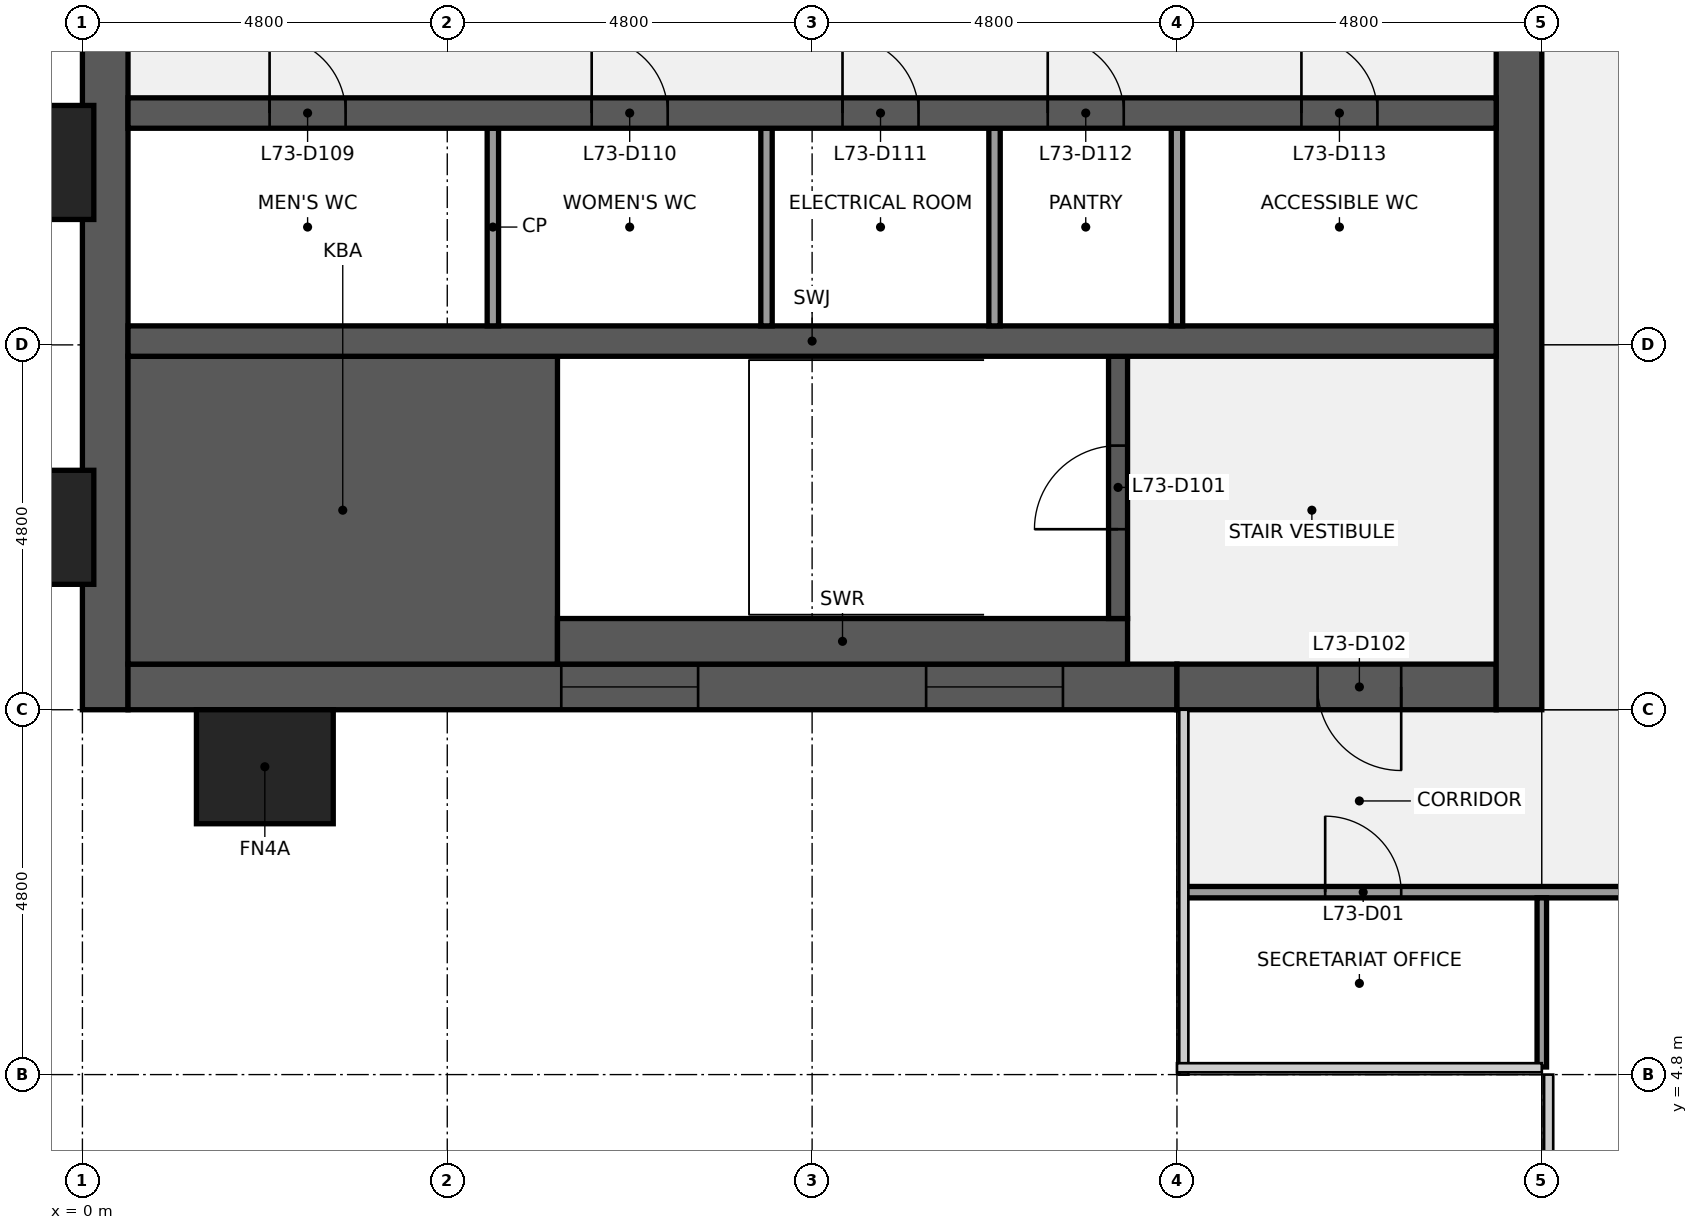
"""IFC4 building model, lengths in metres.
Left out: names, types, materials, properties, quantities, classifications, styles, units other than length and angle.
Written with IfcOpenShell. Run it as: python <this file> out.ifc"""

import sys

from ifc_helpers import new_model, si_unit, direction, frame, frame_2d, origin, origin_2d, place, context, subcontext, project, spatial, rectangle, extrude, element, fill, save


model = new_model("IFC4")
c1 = context("Model", 3, precision=1e-05, world=origin(), true_north=direction((0.0, 1.0)))
c2 = subcontext(c1, "Body", "Model", "MODEL_VIEW")
j1 = project(units=[si_unit("LENGTHUNIT", "METRE"), si_unit("PLANEANGLEUNIT", "RADIAN")], contexts=[c1])
p1 = place(None, origin())
s1 = spatial("IfcSite", under=j1, at=p1, CompositionType="ELEMENT")
p2 = place(p1, origin())
s2 = spatial("IfcBuilding", under=s1, at=p2, CompositionType="ELEMENT")
p3 = place(p2, frame((0.0, 0.0, 330.3)))
s3 = spatial("IfcBuildingStorey", under=s2, at=p3, CompositionType="ELEMENT", Elevation=330.3)
p4 = place(p3, frame((0.3, 9.6, 0.0), z_axis=(0.0, 0.0, 1.0), x_axis=(0.0, 1.0, 0.0)))
e1 = element("IfcWall", 1, at=p4, inside=s3, PredefinedType="SHEAR", context=c2, shape_type="SweptSolid", body=[
    extrude(rectangle(XDim=28.8, YDim=0.6, at=frame_2d((14.4, 0.0))), origin(), (0.0, 0.0, 1.0), 3.84),
])
p5 = place(p4, frame((8.85, 0.0, 0.9)))
e2 = element("IfcOpeningElement", 2, at=p5, cuts=e1, PredefinedType="OPENING", context=c2, shape_type="SweptSolid", body=[
    extrude(rectangle(XDim=1.5, YDim=1.5, at=frame_2d((0.75, 0.75))), frame((0.0, 0.31, 0.0), z_axis=(0.0, -1.0, 0.0), x_axis=(1.0, 0.0, 0.0)), (0.0, 0.0, 1.0), 0.62),
])
p6 = place(p4, frame((18.45, 0.0, 0.9)))
e3 = element("IfcOpeningElement", 3, at=p6, cuts=e1, PredefinedType="OPENING", context=c2, shape_type="SweptSolid", body=[
    extrude(rectangle(XDim=1.5, YDim=1.5, at=frame_2d((0.75, 0.75))), frame((0.0, 0.31, 0.0), z_axis=(0.0, -1.0, 0.0), x_axis=(1.0, 0.0, 0.0)), (0.0, 0.0, 1.0), 0.62),
])
p7 = place(p3, frame((14.4, 9.9, 0.0), z_axis=(0.0, 0.0, 1.0), x_axis=(-1.0, 0.0, 0.0)))
e4 = element("IfcWall", 4, at=p7, inside=s3, PredefinedType="SHEAR", context=c2, shape_type="SweptSolid", body=[
    extrude(rectangle(XDim=13.8, YDim=0.6, at=frame_2d((6.9, 0.0))), origin(), (0.0, 0.0, 1.0), 3.84),
])
p8 = place(p7, frame((6.3, 0.0, 0.9)))
e5 = element("IfcOpeningElement", 5, at=p8, cuts=e4, PredefinedType="OPENING", context=c2, shape_type="SweptSolid", body=[
    extrude(rectangle(XDim=1.8, YDim=1.5, at=frame_2d((0.9, 0.75))), frame((0.0, 0.31, 0.0), z_axis=(0.0, -1.0, 0.0), x_axis=(1.0, 0.0, 0.0)), (0.0, 0.0, 1.0), 0.62),
])
p9 = place(p7, frame((1.5, 0.0, 0.9)))
e6 = element("IfcOpeningElement", 6, at=p9, cuts=e4, PredefinedType="OPENING", context=c2, shape_type="SweptSolid", body=[
    extrude(rectangle(XDim=1.8, YDim=1.5, at=frame_2d((0.9, 0.75))), frame((0.0, 0.31, 0.0), z_axis=(0.0, -1.0, 0.0), x_axis=(1.0, 0.0, 0.0)), (0.0, 0.0, 1.0), 0.62),
])
p10 = place(p3, frame((18.6, 9.9, 0.0), z_axis=(0.0, 0.0, 1.0), x_axis=(-1.0, 0.0, 0.0)))
e7 = element("IfcWall", 7, at=p10, inside=s3, PredefinedType="SHEAR", context=c2, shape_type="SweptSolid", body=[
    extrude(rectangle(XDim=4.2, YDim=0.6, at=frame_2d((2.1, 0.0))), origin(), (0.0, 0.0, 1.0), 3.84),
])
p11 = place(p10, frame((1.25, 0.0, 0.0)))
e8 = element("IfcOpeningElement", 8, at=p11, cuts=e7, PredefinedType="OPENING", context=c2, shape_type="SweptSolid", body=[
    extrude(rectangle(XDim=1.1, YDim=2.1, at=frame_2d((0.55, 1.05))), frame((0.0, 0.31, 0.0), z_axis=(0.0, -1.0, 0.0), x_axis=(1.0, 0.0, 0.0)), (0.0, 0.0, 1.0), 0.62),
])
p12 = place(p3, frame((18.9, 38.4, 0.0), z_axis=(0.0, 0.0, 1.0), x_axis=(0.0, -1.0, 0.0)))
e9 = element("IfcWall", 9, at=p12, inside=s3, PredefinedType="SHEAR", context=c2, shape_type="SweptSolid", body=[
    extrude(rectangle(XDim=28.8, YDim=0.6, at=frame_2d((14.4, 0.0))), origin(), (0.0, 0.0, 1.0), 3.84),
])
p13 = place(p12, frame((18.3, 0.0, 0.0)))
e10 = element("IfcOpeningElement", 10, at=p13, cuts=e9, PredefinedType="OPENING", context=c2, shape_type="SweptSolid", body=[
    extrude(rectangle(XDim=1.8, YDim=2.1, at=frame_2d((0.9, 1.05))), frame((0.0, 0.31, 0.0), z_axis=(0.0, -1.0, 0.0), x_axis=(1.0, 0.0, 0.0)), (0.0, 0.0, 1.0), 0.62),
])
p14 = place(p12, frame((8.7, 0.0, 0.0)))
e11 = element("IfcOpeningElement", 11, at=p14, cuts=e9, PredefinedType="OPENING", context=c2, shape_type="SweptSolid", body=[
    extrude(rectangle(XDim=1.8, YDim=2.1, at=frame_2d((0.9, 1.05))), frame((0.0, 0.31, 0.0), z_axis=(0.0, -1.0, 0.0), x_axis=(1.0, 0.0, 0.0)), (0.0, 0.0, 1.0), 0.62),
])
p15 = place(p3, frame((0.6, 12.225, 0.0), z_axis=(0.0, 0.0, 1.0), x_axis=(1.0, 0.0, 0.0)))
e12 = element("IfcWall", 12, at=p15, inside=s3, PredefinedType="SHEAR", context=c2, shape_type="SweptSolid", body=[
    extrude(rectangle(XDim=5.65, YDim=4.05, at=frame_2d((2.825, 0.0))), origin(), (0.0, 0.0, 1.0), 3.84),
])
p16 = place(p3, frame((6.25, 10.5, 0.0), z_axis=(0.0, 0.0, 1.0), x_axis=(1.0, 0.0, 0.0)))
e13 = element("IfcWall", 13, at=p16, inside=s3, PredefinedType="SHEAR", context=c2, shape_type="SweptSolid", body=[
    extrude(rectangle(XDim=7.5, YDim=0.6, at=frame_2d((3.75, 0.0))), origin(), (0.0, 0.0, 1.0), 3.84),
])
p17 = place(p3, frame((13.625, 10.8, 0.0), z_axis=(0.0, 0.0, 1.0), x_axis=(0.0, 1.0, 0.0)))
e14 = element("IfcWall", 14, at=p17, inside=s3, PredefinedType="SHEAR", context=c2, shape_type="SweptSolid", body=[
    extrude(rectangle(XDim=3.45, YDim=0.25, at=frame_2d((1.725, 0.0))), origin(), (0.0, 0.0, 1.0), 3.84),
])
p18 = place(p17, frame((1.175, 0.0, 0.0)))
e15 = element("IfcOpeningElement", 15, at=p18, cuts=e14, PredefinedType="OPENING", context=c2, shape_type="SweptSolid", body=[
    extrude(rectangle(XDim=1.1, YDim=2.1, at=frame_2d((0.55, 1.05))), frame((0.0, 0.135, 0.0), z_axis=(0.0, -1.0, 0.0), x_axis=(1.0, 0.0, 0.0)), (0.0, 0.0, 1.0), 0.27),
])
p19 = place(p3, frame((0.6, 14.45, 0.0), z_axis=(0.0, 0.0, 1.0), x_axis=(1.0, 0.0, 0.0)))
e16 = element("IfcWall", 16, at=p19, inside=s3, PredefinedType="SHEAR", context=c2, shape_type="SweptSolid", body=[
    extrude(rectangle(XDim=18.0, YDim=0.4, at=frame_2d((9.0, 0.0))), origin(), (0.0, 0.0, 1.0), 3.84),
])
for number, where, z_axis, x_axis in (
    (17, (5.4, 14.65, 0.0), (0.0, 0.0, 1.0), (0.0, 1.0, 0.0)),
    (18, (9.0, 14.65, 0.0), (0.0, 0.0, 1.0), (0.0, 1.0, 0.0)),
    (19, (12.0, 14.65, 0.0), (0.0, 0.0, 1.0), (0.0, 1.0, 0.0)),
    (20, (14.4, 14.65, 0.0), (0.0, 0.0, 1.0), (0.0, 1.0, 0.0)),
):
    element("IfcWall", number, at=place(p3, frame(where, z_axis=z_axis, x_axis=x_axis)), inside=s3, PredefinedType="PARTITIONING", context=c2, shape_type="SweptSolid", body=[
        extrude(rectangle(XDim=2.6, YDim=0.15, at=frame_2d((1.3, 0.0))), origin(), (0.0, 0.0, 1.0), 3.84),
    ])
p20 = place(p3, frame((0.6, 17.45, 0.0), z_axis=(0.0, 0.0, 1.0), x_axis=(1.0, 0.0, 0.0)))
e21 = element("IfcWall", 21, at=p20, inside=s3, PredefinedType="SHEAR", context=c2, shape_type="SweptSolid", body=[
    extrude(rectangle(XDim=18.0, YDim=0.4, at=frame_2d((9.0, 0.0))), origin(), (0.0, 0.0, 1.0), 3.84),
])
p21 = place(p20, frame((1.863, 0.0, 0.0)))
e22 = element("IfcOpeningElement", 22, at=p21, cuts=e21, PredefinedType="OPENING", context=c2, shape_type="SweptSolid", body=[
    extrude(rectangle(XDim=1.0, YDim=2.1, at=frame_2d((0.5, 1.05))), frame((0.0, 0.21, 0.0), z_axis=(0.0, -1.0, 0.0), x_axis=(1.0, 0.0, 0.0)), (0.0, 0.0, 1.0), 0.42),
])
p22 = place(p20, frame((6.1, 0.0, 0.0)))
e23 = element("IfcOpeningElement", 23, at=p22, cuts=e21, PredefinedType="OPENING", context=c2, shape_type="SweptSolid", body=[
    extrude(rectangle(XDim=1.0, YDim=2.1, at=frame_2d((0.5, 1.05))), frame((0.0, 0.21, 0.0), z_axis=(0.0, -1.0, 0.0), x_axis=(1.0, 0.0, 0.0)), (0.0, 0.0, 1.0), 0.42),
])
p23 = place(p20, frame((9.4, 0.0, 0.0)))
e24 = element("IfcOpeningElement", 24, at=p23, cuts=e21, PredefinedType="OPENING", context=c2, shape_type="SweptSolid", body=[
    extrude(rectangle(XDim=1.0, YDim=2.1, at=frame_2d((0.5, 1.05))), frame((0.0, 0.21, 0.0), z_axis=(0.0, -1.0, 0.0), x_axis=(1.0, 0.0, 0.0)), (0.0, 0.0, 1.0), 0.42),
])
p24 = place(p20, frame((12.1, 0.0, 0.0)))
e25 = element("IfcOpeningElement", 25, at=p24, cuts=e21, PredefinedType="OPENING", context=c2, shape_type="SweptSolid", body=[
    extrude(rectangle(XDim=1.0, YDim=2.1, at=frame_2d((0.5, 1.05))), frame((0.0, 0.21, 0.0), z_axis=(0.0, -1.0, 0.0), x_axis=(1.0, 0.0, 0.0)), (0.0, 0.0, 1.0), 0.42),
])
p25 = place(p20, frame((15.438, 0.0, 0.0)))
e26 = element("IfcOpeningElement", 26, at=p25, cuts=e21, PredefinedType="OPENING", context=c2, shape_type="SweptSolid", body=[
    extrude(rectangle(XDim=1.0, YDim=2.1, at=frame_2d((0.5, 1.05))), frame((0.0, 0.21, 0.0), z_axis=(0.0, -1.0, 0.0), x_axis=(1.0, 0.0, 0.0)), (0.0, 0.0, 1.0), 0.42),
])
p26 = place(p3, frame((14.5, 7.2, 0.0), z_axis=(0.0, 0.0, 1.0), x_axis=(1.0, 0.0, 0.0)))
e27 = element("IfcWall", 27, at=p26, inside=s3, PredefinedType="PARTITIONING", context=c2, shape_type="SweptSolid", body=[
    extrude(rectangle(XDim=28.6, YDim=0.15, at=frame_2d((14.3, 0.0))), origin(), (0.0, 0.0, 1.0), 2.87),
])
p27 = place(p26, frame((1.85, 0.0, 0.0)))
e28 = element("IfcOpeningElement", 28, at=p27, cuts=e27, PredefinedType="OPENING", context=c2, shape_type="SweptSolid", body=[
    extrude(rectangle(XDim=1.0, YDim=2.1, at=frame_2d((0.5, 1.05))), frame((0.0, 0.085, 0.0), z_axis=(0.0, -1.0, 0.0), x_axis=(1.0, 0.0, 0.0)), (0.0, 0.0, 1.0), 0.17),
])
p28 = place(p26, frame((6.6, 0.0, 0.0)))
e29 = element("IfcOpeningElement", 29, at=p28, cuts=e27, PredefinedType="OPENING", context=c2, shape_type="SweptSolid", body=[
    extrude(rectangle(XDim=1.0, YDim=2.1, at=frame_2d((0.5, 1.05))), frame((0.0, 0.085, 0.0), z_axis=(0.0, -1.0, 0.0), x_axis=(1.0, 0.0, 0.0)), (0.0, 0.0, 1.0), 0.17),
])
p29 = place(p26, frame((13.8, 0.0, 0.0)))
e30 = element("IfcOpeningElement", 30, at=p29, cuts=e27, PredefinedType="OPENING", context=c2, shape_type="SweptSolid", body=[
    extrude(rectangle(XDim=1.0, YDim=2.1, at=frame_2d((0.5, 1.05))), frame((0.0, 0.085, 0.0), z_axis=(0.0, -1.0, 0.0), x_axis=(1.0, 0.0, 0.0)), (0.0, 0.0, 1.0), 0.17),
])
p30 = place(p26, frame((21.0, 0.0, 0.0)))
e31 = element("IfcOpeningElement", 31, at=p30, cuts=e27, PredefinedType="OPENING", context=c2, shape_type="SweptSolid", body=[
    extrude(rectangle(XDim=1.0, YDim=2.1, at=frame_2d((0.5, 1.05))), frame((0.0, 0.085, 0.0), z_axis=(0.0, -1.0, 0.0), x_axis=(1.0, 0.0, 0.0)), (0.0, 0.0, 1.0), 0.17),
])
p31 = place(p26, frame((25.75, 0.0, 0.0)))
e32 = element("IfcOpeningElement", 32, at=p31, cuts=e27, PredefinedType="OPENING", context=c2, shape_type="SweptSolid", body=[
    extrude(rectangle(XDim=1.0, YDim=2.1, at=frame_2d((0.5, 1.05))), frame((0.0, 0.085, 0.0), z_axis=(0.0, -1.0, 0.0), x_axis=(1.0, 0.0, 0.0)), (0.0, 0.0, 1.0), 0.17),
])
p32 = place(p3, frame((19.2, 4.9, 0.0), z_axis=(0.0, 0.0, 1.0), x_axis=(0.0, 1.0, 0.0)))
e33 = element("IfcWall", 33, at=p32, inside=s3, PredefinedType="PARTITIONING", context=c2, shape_type="SweptSolid", body=[
    extrude(rectangle(XDim=2.225, YDim=0.125, at=frame_2d((1.113, 0.0))), origin(), (0.0, 0.0, 1.0), 2.87),
])
for number, where, z_axis, x_axis in (
    (34, (-0.75, 12.0, 0.0), (0.0, 0.0, 1.0), (0.0, 1.0, 0.0)),
    (35, (-0.75, 16.8, 0.0), (0.0, 0.0, 1.0), (0.0, 1.0, 0.0)),
    (36, (2.4, 8.85, 0.0), (0.0, 0.0, 1.0), (1.0, 0.0, 0.0)),
):
    element("IfcColumn", number, at=place(p3, frame(where, z_axis=z_axis, x_axis=x_axis)), inside=s3, PredefinedType="PILASTER", context=c2, shape_type="SweptSolid", body=[
        extrude(rectangle(XDim=1.8, YDim=1.5, at=origin_2d()), origin(), (0.0, 0.0, 1.0), 4.0),
    ])
p33 = place(p18, origin())
e37 = element("IfcDoor", 37, at=p33, inside=s3, OperationType="SINGLE_SWING_LEFT", PredefinedType="DOOR", context=c2, shape_type="SweptSolid", body=[
    extrude(rectangle(XDim=1.1, YDim=2.1, at=frame_2d((0.55, 1.05))), frame((0.0, 0.025, 0.0), z_axis=(0.0, -1.0, 0.0), x_axis=(1.0, 0.0, 0.0)), (0.0, 0.0, 1.0), 0.05),
])
fill(e15, e37)
p34 = place(p11, origin())
e38 = element("IfcDoor", 38, at=p34, inside=s3, OperationType="SINGLE_SWING_LEFT", PredefinedType="DOOR", context=c2, shape_type="SweptSolid", body=[
    extrude(rectangle(XDim=1.1, YDim=2.1, at=frame_2d((0.55, 1.05))), frame((0.0, 0.025, 0.0), z_axis=(0.0, -1.0, 0.0), x_axis=(1.0, 0.0, 0.0)), (0.0, 0.0, 1.0), 0.05),
])
fill(e8, e38)
p35 = place(p21, origin())
e39 = element("IfcDoor", 39, at=p35, inside=s3, OperationType="SINGLE_SWING_LEFT", PredefinedType="DOOR", context=c2, shape_type="SweptSolid", body=[
    extrude(rectangle(XDim=1.0, YDim=2.1, at=frame_2d((0.5, 1.05))), frame((0.0, 0.025, 0.0), z_axis=(0.0, -1.0, 0.0), x_axis=(1.0, 0.0, 0.0)), (0.0, 0.0, 1.0), 0.05),
])
fill(e22, e39)
p36 = place(p22, origin())
e40 = element("IfcDoor", 40, at=p36, inside=s3, OperationType="SINGLE_SWING_LEFT", PredefinedType="DOOR", context=c2, shape_type="SweptSolid", body=[
    extrude(rectangle(XDim=1.0, YDim=2.1, at=frame_2d((0.5, 1.05))), frame((0.0, 0.025, 0.0), z_axis=(0.0, -1.0, 0.0), x_axis=(1.0, 0.0, 0.0)), (0.0, 0.0, 1.0), 0.05),
])
fill(e23, e40)
p37 = place(p23, origin())
e41 = element("IfcDoor", 41, at=p37, inside=s3, OperationType="SINGLE_SWING_LEFT", PredefinedType="DOOR", context=c2, shape_type="SweptSolid", body=[
    extrude(rectangle(XDim=1.0, YDim=2.1, at=frame_2d((0.5, 1.05))), frame((0.0, 0.025, 0.0), z_axis=(0.0, -1.0, 0.0), x_axis=(1.0, 0.0, 0.0)), (0.0, 0.0, 1.0), 0.05),
])
fill(e24, e41)
p38 = place(p24, origin())
e42 = element("IfcDoor", 42, at=p38, inside=s3, OperationType="SINGLE_SWING_LEFT", PredefinedType="DOOR", context=c2, shape_type="SweptSolid", body=[
    extrude(rectangle(XDim=1.0, YDim=2.1, at=frame_2d((0.5, 1.05))), frame((0.0, 0.025, 0.0), z_axis=(0.0, -1.0, 0.0), x_axis=(1.0, 0.0, 0.0)), (0.0, 0.0, 1.0), 0.05),
])
fill(e25, e42)
p39 = place(p25, origin())
e43 = element("IfcDoor", 43, at=p39, inside=s3, OperationType="SINGLE_SWING_LEFT", PredefinedType="DOOR", context=c2, shape_type="SweptSolid", body=[
    extrude(rectangle(XDim=1.0, YDim=2.1, at=frame_2d((0.5, 1.05))), frame((0.0, 0.025, 0.0), z_axis=(0.0, -1.0, 0.0), x_axis=(1.0, 0.0, 0.0)), (0.0, 0.0, 1.0), 0.05),
])
fill(e26, e43)
p40 = place(p8, origin())
e44 = element("IfcWindow", 44, at=p40, inside=s3, PartitioningType="SINGLE_PANEL", PredefinedType="WINDOW", context=c2, shape_type="SweptSolid", body=[
    extrude(rectangle(XDim=1.8, YDim=1.5, at=frame_2d((0.9, 0.75))), frame((0.0, 0.03, 0.0), z_axis=(0.0, -1.0, 0.0), x_axis=(1.0, 0.0, 0.0)), (0.0, 0.0, 1.0), 0.06),
])
fill(e5, e44)
p41 = place(p9, origin())
e45 = element("IfcWindow", 45, at=p41, inside=s3, PartitioningType="SINGLE_PANEL", PredefinedType="WINDOW", context=c2, shape_type="SweptSolid", body=[
    extrude(rectangle(XDim=1.8, YDim=1.5, at=frame_2d((0.9, 0.75))), frame((0.0, 0.03, 0.0), z_axis=(0.0, -1.0, 0.0), x_axis=(1.0, 0.0, 0.0)), (0.0, 0.0, 1.0), 0.06),
])
fill(e6, e45)
p42 = place(p27, origin())
e46 = element("IfcDoor", 46, at=p42, inside=s3, OperationType="SINGLE_SWING_LEFT", PredefinedType="DOOR", context=c2, shape_type="SweptSolid", body=[
    extrude(rectangle(XDim=1.0, YDim=2.1, at=frame_2d((0.5, 1.05))), frame((0.0, 0.025, 0.0), z_axis=(0.0, -1.0, 0.0), x_axis=(1.0, 0.0, 0.0)), (0.0, 0.0, 1.0), 0.05),
])
fill(e28, e46)
save(model, sys.argv[1])
